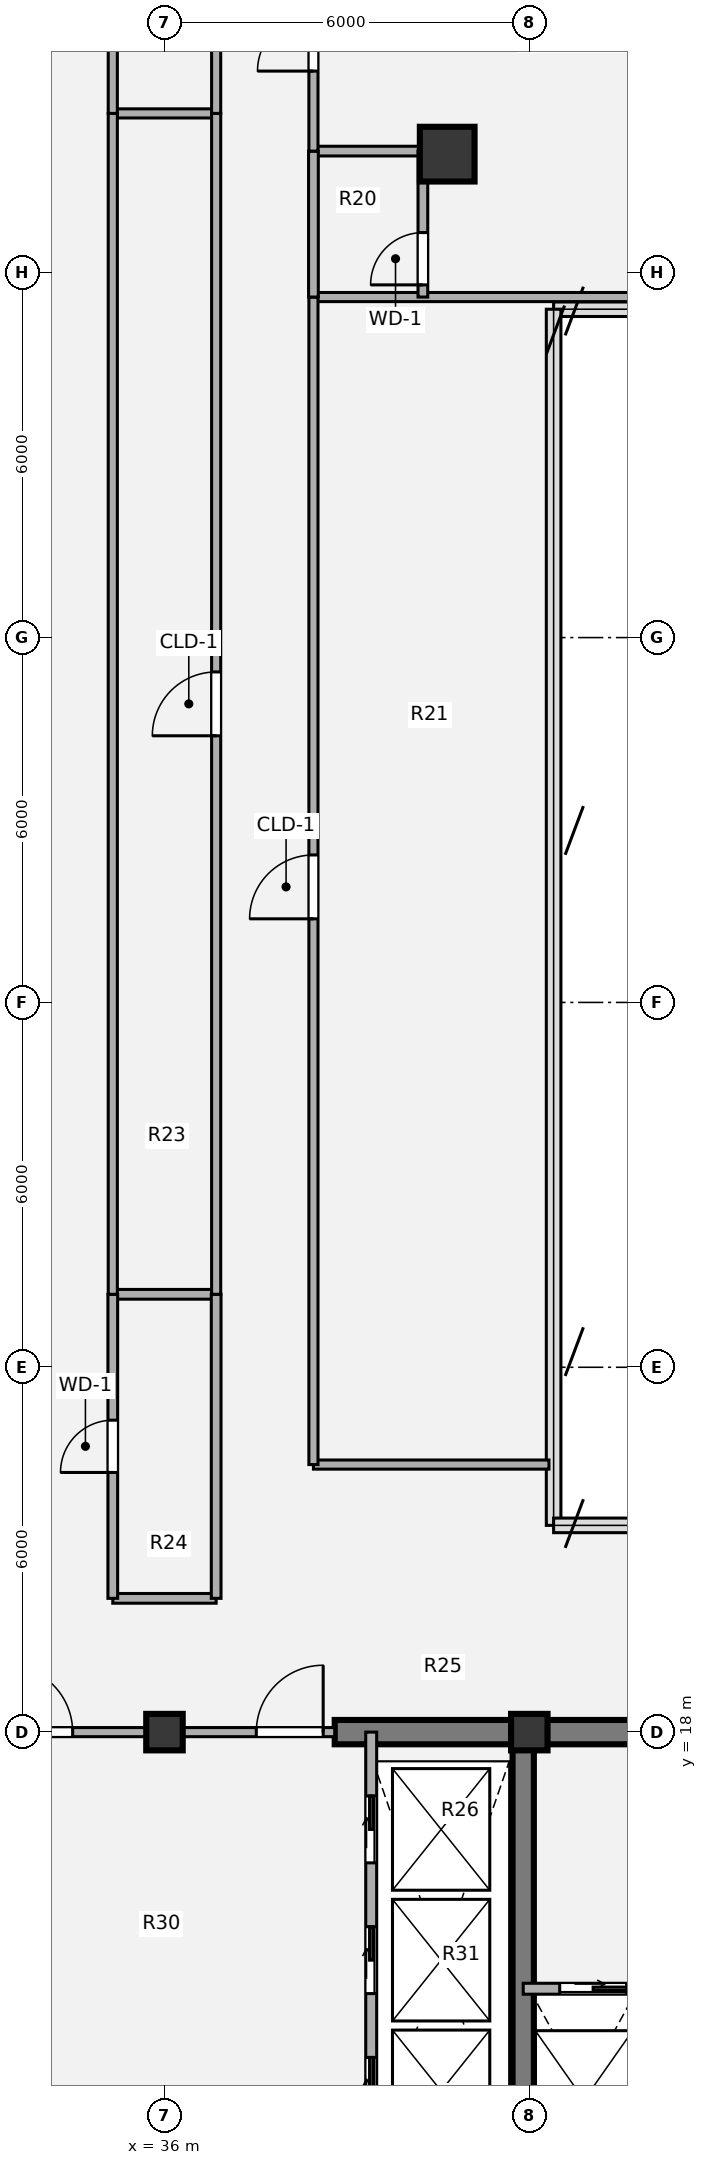
"""IFC4 building model, lengths in metres.
Left out: names, types, materials, properties, quantities, classifications, styles, units other than length and angle.
Written with IfcOpenShell. Run it as: python <this file> out.ifc"""

import sys

from ifc_helpers import new_model, si_unit, direction, frame, frame_2d, origin, origin_2d, place, context, subcontext, project, spatial, rectangle, hollow_circle, extrude, source, transform, mapped, element, fill, save


model = new_model("IFC4")
c1 = context("Model", 3, precision=1e-05, world=origin(), true_north=direction((0.0, 1.0)))
c2 = subcontext(c1, "Body", "Model", "MODEL_VIEW")
j1 = project(units=[si_unit("LENGTHUNIT", "METRE"), si_unit("PLANEANGLEUNIT", "RADIAN")], contexts=[c1])
p1 = place(None, origin())
s1 = spatial("IfcSite", under=j1, at=p1, CompositionType="ELEMENT")
p2 = place(p1, origin())
s2 = spatial("IfcBuilding", under=s1, at=p2, CompositionType="ELEMENT")
p3 = place(p2, frame((0.0, 0.0, 230.58)))
s3 = spatial("IfcBuildingStorey", under=s2, at=p3, CompositionType="ELEMENT", Elevation=230.58)
m1 = source(origin(), c2, "Body", "SweptSolid", [
    extrude(rectangle(XDim=0.6, YDim=0.6, at=origin_2d()), origin(), (0.0, 0.0, 1.0), 3.78),
])
for number, where, z_axis, x_axis in (
    (1, (36.0, 18.0, 0.0), (0.0, 0.0, 1.0), (1.0, 0.0, 0.0)),
    (2, (42.0, 18.0, 0.0), (0.0, 0.0, 1.0), (1.0, 0.0, 0.0)),
):
    element("IfcColumn", number, at=place(p3, frame(where, z_axis=z_axis, x_axis=x_axis)), inside=s3, PredefinedType="COLUMN", context=c2, shape_type="MappedRepresentation", body=[
        mapped(m1, transform((0.0, 0.0, 0.0), x_axis=(1.0, 0.0, 0.0), y_axis=(0.0, 1.0, 0.0), z_axis=(0.0, 0.0, 1.0), scale=1.0)),
    ])
p4 = place(p3, frame((38.8, 18.0, 0.0), z_axis=(0.0, 0.0, 1.0), x_axis=(1.0, 0.0, 0.0)))
e3 = element("IfcWall", 3, at=p4, inside=s3, PredefinedType="SHEAR", context=c2, shape_type="SweptSolid", body=[
    extrude(rectangle(XDim=9.4, YDim=0.4, at=frame_2d((4.7, 0.0))), origin(), (0.0, 0.0, 1.0), 3.78),
])
p5 = place(p4, frame((5.45, 0.0, 0.0)))
e4 = element("IfcOpeningElement", 4, at=p5, cuts=e3, PredefinedType="OPENING", context=c2, shape_type="SweptSolid", body=[
    extrude(rectangle(XDim=1.1, YDim=2.1, at=origin_2d()), frame((0.55, 0.21, 1.05), z_axis=(0.0, -1.0, 0.0), x_axis=(1.0, 0.0, 0.0)), (0.0, 0.0, 1.0), 0.42),
])
p6 = place(p3, frame((41.9, 18.0, 0.0), z_axis=(0.0, 0.0, 1.0), x_axis=(0.0, -1.0, 0.0)))
e5 = element("IfcWall", 5, at=p6, inside=s3, PredefinedType="SHEAR", context=c2, shape_type="SweptSolid", body=[
    extrude(rectangle(XDim=12.0, YDim=0.35, at=frame_2d((6.0, 0.0))), origin(), (0.0, 0.0, 1.0), 3.78),
])
p7 = place(p6, frame((10.08, 0.0, 0.0)))
e6 = element("IfcOpeningElement", 6, at=p7, cuts=e5, PredefinedType="OPENING", context=c2, shape_type="SweptSolid", body=[
    extrude(rectangle(XDim=1.3, YDim=2.1, at=origin_2d()), frame((0.65, 0.185, 1.05), z_axis=(0.0, -1.0, 0.0), x_axis=(1.0, 0.0, 0.0)), (0.0, 0.0, 1.0), 0.37),
])
m2 = source(origin(), c2, "Body", "SweptSolid", [
    extrude(hollow_circle(Radius=0.45, WallThickness=0.032, at=origin_2d()), origin(), (0.0, 0.0, 1.0), 3.78),
])
p8 = place(p3, frame((40.65, 43.95, 0.0), z_axis=(0.0, 0.0, 1.0), x_axis=(1.0, 0.0, 0.0)))
e7 = element("IfcColumn", 7, at=p8, inside=s3, PredefinedType="COLUMN", context=c2, shape_type="MappedRepresentation", body=[
    mapped(m2, transform((0.0, 0.0, 0.0), x_axis=(1.0, 0.0, 0.0), y_axis=(0.0, 1.0, 0.0), z_axis=(0.0, 0.0, 1.0), scale=1.0)),
])
p9 = place(p3, frame((33.2, 18.0, 0.0), z_axis=(0.0, 0.0, 1.0), x_axis=(1.0, 0.0, 0.0)))
e8 = element("IfcWall", 8, at=p9, inside=s3, PredefinedType="PARTITIONING", context=c2, shape_type="SweptSolid", body=[
    extrude(rectangle(XDim=5.6, YDim=0.15, at=frame_2d((2.8, 0.0))), origin(), (0.0, 0.0, 1.0), 2.515),
])
p10 = place(p9, frame((0.19, 0.0, 0.0)))
e9 = element("IfcOpeningElement", 9, at=p10, cuts=e8, PredefinedType="OPENING", context=c2, shape_type="SweptSolid", body=[
    extrude(rectangle(XDim=1.1, YDim=2.1, at=origin_2d()), frame((0.55, 0.085, 1.05), z_axis=(0.0, -1.0, 0.0), x_axis=(1.0, 0.0, 0.0)), (0.0, 0.0, 1.0), 0.17),
])
p11 = place(p9, frame((4.31, 0.0, 0.0)))
e10 = element("IfcOpeningElement", 10, at=p11, cuts=e8, PredefinedType="OPENING", context=c2, shape_type="SweptSolid", body=[
    extrude(rectangle(XDim=1.1, YDim=2.1, at=origin_2d()), frame((0.55, 0.085, 1.05), z_axis=(0.0, -1.0, 0.0), x_axis=(1.0, 0.0, 0.0)), (0.0, 0.0, 1.0), 0.17),
])
p12 = place(p3, frame((41.9, 13.78, 0.0), z_axis=(0.0, 0.0, 1.0), x_axis=(1.0, 0.0, 0.0)))
e11 = element("IfcWall", 11, at=p12, inside=s3, PredefinedType="PARTITIONING", context=c2, shape_type="SweptSolid", body=[
    extrude(rectangle(XDim=6.1, YDim=0.18, at=frame_2d((3.05, 0.0))), origin(), (0.0, 0.0, 1.0), 3.5),
])
p13 = place(p12, frame((0.6, 0.0, 0.0)))
e12 = element("IfcOpeningElement", 12, at=p13, cuts=e11, PredefinedType="OPENING", context=c2, shape_type="SweptSolid", body=[
    extrude(rectangle(XDim=1.1, YDim=2.1, at=origin_2d()), frame((0.55, 0.1, 1.05), z_axis=(0.0, -1.0, 0.0), x_axis=(1.0, 0.0, 0.0)), (0.0, 0.0, 1.0), 0.2),
])
p14 = place(p12, frame((3.8, 0.0, 0.0)))
e13 = element("IfcOpeningElement", 13, at=p14, cuts=e11, PredefinedType="OPENING", context=c2, shape_type="SweptSolid", body=[
    extrude(rectangle(XDim=1.1, YDim=2.1, at=origin_2d()), frame((0.55, 0.1, 1.05), z_axis=(0.0, -1.0, 0.0), x_axis=(1.0, 0.0, 0.0)), (0.0, 0.0, 1.0), 0.2),
])
p15 = place(p3, frame((39.4, 11.0, 0.0), z_axis=(0.0, 0.0, 1.0), x_axis=(0.0, 1.0, 0.0)))
e14 = element("IfcWall", 14, at=p15, inside=s3, PredefinedType="PARTITIONING", context=c2, shape_type="SweptSolid", body=[
    extrude(rectangle(XDim=7.0, YDim=0.18, at=frame_2d((3.5, 0.0))), origin(), (0.0, 0.0, 1.0), 3.5),
])
p16 = place(p15, frame((0.55, 0.0, 0.0)))
e15 = element("IfcOpeningElement", 15, at=p16, cuts=e14, PredefinedType="OPENING", context=c2, shape_type="SweptSolid", body=[
    extrude(rectangle(XDim=1.1, YDim=2.1, at=origin_2d()), frame((0.55, 0.1, 1.05), z_axis=(0.0, -1.0, 0.0), x_axis=(1.0, 0.0, 0.0)), (0.0, 0.0, 1.0), 0.2),
])
p17 = place(p15, frame((2.7, 0.0, 0.0)))
e16 = element("IfcOpeningElement", 16, at=p17, cuts=e14, PredefinedType="OPENING", context=c2, shape_type="SweptSolid", body=[
    extrude(rectangle(XDim=1.1, YDim=2.1, at=origin_2d()), frame((0.55, 0.1, 1.05), z_axis=(0.0, -1.0, 0.0), x_axis=(1.0, 0.0, 0.0)), (0.0, 0.0, 1.0), 0.2),
])
p18 = place(p15, frame((4.85, 0.0, 0.0)))
e17 = element("IfcOpeningElement", 17, at=p18, cuts=e14, PredefinedType="OPENING", context=c2, shape_type="SweptSolid", body=[
    extrude(rectangle(XDim=1.1, YDim=2.1, at=origin_2d()), frame((0.55, 0.1, 1.05), z_axis=(0.0, -1.0, 0.0), x_axis=(1.0, 0.0, 0.0)), (0.0, 0.0, 1.0), 0.2),
])
p19 = place(p3, frame((35.15, 20.2, 0.0), z_axis=(0.0, 0.0, 1.0), x_axis=(1.0, 0.0, 0.0)))
e18 = element("IfcWall", 18, at=p19, inside=s3, PredefinedType="PLUMBINGWALL", context=c2, shape_type="SweptSolid", body=[
    extrude(rectangle(XDim=1.7, YDim=0.16, at=frame_2d((0.85, 0.0))), origin(), (0.0, 0.0, 1.0), 3.5),
])
p20 = place(p3, frame((38.45, 22.4, 0.0), z_axis=(0.0, 0.0, 1.0), x_axis=(1.0, 0.0, 0.0)))
e19 = element("IfcWall", 19, at=p20, inside=s3, PredefinedType="PARTITIONING", context=c2, shape_type="SweptSolid", body=[
    extrude(rectangle(XDim=3.873, YDim=0.15, at=frame_2d((1.937, 0.0))), origin(), (0.0, 0.0, 1.0), 3.5),
])
p21 = place(p3, frame((35.15, 25.2, 0.0), z_axis=(0.0, 0.0, 1.0), x_axis=(1.0, 0.0, 0.0)))
e20 = element("IfcWall", 20, at=p21, inside=s3, PredefinedType="PLUMBINGWALL", context=c2, shape_type="SweptSolid", body=[
    extrude(rectangle(XDim=1.7, YDim=0.16, at=frame_2d((0.85, 0.0))), origin(), (0.0, 0.0, 1.0), 3.5),
])
p22 = place(p3, frame((38.45, 41.6, 0.0), z_axis=(0.0, 0.0, 1.0), x_axis=(1.0, 0.0, 0.0)))
e21 = element("IfcWall", 21, at=p22, inside=s3, PredefinedType="PARTITIONING", context=c2, shape_type="SweptSolid", body=[
    extrude(rectangle(XDim=5.993, YDim=0.15, at=frame_2d((2.997, 0.0))), origin(), (0.0, 0.0, 1.0), 3.5),
])
p23 = place(p3, frame((38.45, 44.0, 0.0), z_axis=(0.0, 0.0, 1.0), x_axis=(1.0, 0.0, 0.0)))
e22 = element("IfcWall", 22, at=p23, inside=s3, PredefinedType="PLUMBINGWALL", context=c2, shape_type="SweptSolid", body=[
    extrude(rectangle(XDim=1.8, YDim=0.16, at=frame_2d((0.9, 0.0))), origin(), (0.0, 0.0, 1.0), 2.903),
])
p24 = place(p3, frame((35.15, 44.62, 0.0), z_axis=(0.0, 0.0, 1.0), x_axis=(1.0, 0.0, 0.0)))
e23 = element("IfcWall", 23, at=p24, inside=s3, PredefinedType="PARTITIONING", context=c2, shape_type="SweptSolid", body=[
    extrude(rectangle(XDim=1.7, YDim=0.15, at=frame_2d((0.85, 0.0))), origin(), (0.0, 0.0, 1.0), 3.259),
])
p25 = place(p3, frame((35.15, 20.2, 0.0), z_axis=(0.0, 0.0, 1.0), x_axis=(0.0, 1.0, 0.0)))
e24 = element("IfcWall", 24, at=p25, inside=s3, PredefinedType="PLUMBINGWALL", context=c2, shape_type="SweptSolid", body=[
    extrude(rectangle(XDim=5.0, YDim=0.16, at=frame_2d((2.5, 0.0))), origin(), (0.0, 0.0, 1.0), 3.5),
])
p26 = place(p25, frame((2.07, 0.0, 0.0)))
e25 = element("IfcOpeningElement", 25, at=p26, cuts=e24, PredefinedType="OPENING", context=c2, shape_type="SweptSolid", body=[
    extrude(rectangle(XDim=0.86, YDim=2.1, at=origin_2d()), frame((0.43, 0.09, 1.05), z_axis=(0.0, -1.0, 0.0), x_axis=(1.0, 0.0, 0.0)), (0.0, 0.0, 1.0), 0.18),
])
p27 = place(p3, frame((35.15, 25.2, 0.0), z_axis=(0.0, 0.0, 1.0), x_axis=(0.0, 1.0, 0.0)))
e26 = element("IfcWall", 26, at=p27, inside=s3, PredefinedType="PARTITIONING", context=c2, shape_type="SweptSolid", body=[
    extrude(rectangle(XDim=19.42, YDim=0.15, at=frame_2d((9.71, 0.0))), origin(), (0.0, 0.0, 1.0), 3.5),
])
p28 = place(p3, frame((35.15, 44.62, 0.0), z_axis=(0.0, 0.0, 1.0), x_axis=(0.0, 1.0, 0.0)))
e27 = element("IfcWall", 27, at=p28, inside=s3, PredefinedType="PARTITIONING", context=c2, shape_type="SweptSolid", body=[
    extrude(rectangle(XDim=12.58, YDim=0.15, at=frame_2d((6.29, 0.0))), origin(), (0.0, 0.0, 1.0), 3.5),
])
p29 = place(p28, frame((5.83, 0.0, 0.0)))
e28 = element("IfcOpeningElement", 28, at=p29, cuts=e27, PredefinedType="OPENING", context=c2, shape_type="SweptSolid", body=[
    extrude(rectangle(XDim=0.86, YDim=2.1, at=origin_2d()), frame((0.43, 0.085, 1.05), z_axis=(0.0, -1.0, 0.0), x_axis=(1.0, 0.0, 0.0)), (0.0, 0.0, 1.0), 0.17),
])
p30 = place(p3, frame((36.85, 20.2, 0.0), z_axis=(0.0, 0.0, 1.0), x_axis=(0.0, 1.0, 0.0)))
e29 = element("IfcWall", 29, at=p30, inside=s3, PredefinedType="PLUMBINGWALL", context=c2, shape_type="SweptSolid", body=[
    extrude(rectangle(XDim=5.0, YDim=0.16, at=frame_2d((2.5, 0.0))), origin(), (0.0, 0.0, 1.0), 3.5),
])
p31 = place(p3, frame((36.85, 25.2, 0.0), z_axis=(0.0, 0.0, 1.0), x_axis=(0.0, 1.0, 0.0)))
e30 = element("IfcWall", 30, at=p31, inside=s3, PredefinedType="PARTITIONING", context=c2, shape_type="SweptSolid", body=[
    extrude(rectangle(XDim=19.42, YDim=0.15, at=frame_2d((9.71, 0.0))), origin(), (0.0, 0.0, 1.0), 3.5),
])
p32 = place(p31, frame((9.185, 0.0, 0.0)))
e31 = element("IfcOpeningElement", 31, at=p32, cuts=e30, PredefinedType="OPENING", context=c2, shape_type="SweptSolid", body=[
    extrude(rectangle(XDim=1.05, YDim=2.1, at=origin_2d()), frame((0.525, 0.085, 1.05), z_axis=(0.0, -1.0, 0.0), x_axis=(1.0, 0.0, 0.0)), (0.0, 0.0, 1.0), 0.17),
])
p33 = place(p3, frame((36.85, 44.62, 0.0), z_axis=(0.0, 0.0, 1.0), x_axis=(0.0, 1.0, 0.0)))
e32 = element("IfcWall", 32, at=p33, inside=s3, PredefinedType="PARTITIONING", context=c2, shape_type="SweptSolid", body=[
    extrude(rectangle(XDim=12.58, YDim=0.15, at=frame_2d((6.29, 0.0))), origin(), (0.0, 0.0, 1.0), 3.5),
])
p34 = place(p3, frame((38.45, 22.4, 0.0), z_axis=(0.0, 0.0, 1.0), x_axis=(0.0, 1.0, 0.0)))
e33 = element("IfcWall", 33, at=p34, inside=s3, PredefinedType="PARTITIONING", context=c2, shape_type="SweptSolid", body=[
    extrude(rectangle(XDim=19.2, YDim=0.15, at=frame_2d((9.6, 0.0))), origin(), (0.0, 0.0, 1.0), 3.5),
])
p35 = place(p34, frame((8.975, 0.0, 0.0)))
e34 = element("IfcOpeningElement", 34, at=p35, cuts=e33, PredefinedType="OPENING", context=c2, shape_type="SweptSolid", body=[
    extrude(rectangle(XDim=1.05, YDim=2.1, at=origin_2d()), frame((0.525, 0.085, 1.05), z_axis=(0.0, -1.0, 0.0), x_axis=(1.0, 0.0, 0.0)), (0.0, 0.0, 1.0), 0.17),
])
p36 = place(p3, frame((38.45, 41.6, 0.0), z_axis=(0.0, 0.0, 1.0), x_axis=(0.0, 1.0, 0.0)))
e35 = element("IfcWall", 35, at=p36, inside=s3, PredefinedType="PLUMBINGWALL", context=c2, shape_type="SweptSolid", body=[
    extrude(rectangle(XDim=2.4, YDim=0.16, at=frame_2d((1.2, 0.0))), origin(), (0.0, 0.0, 1.0), 3.5),
])
p37 = place(p3, frame((38.45, 44.0, 0.0), z_axis=(0.0, 0.0, 1.0), x_axis=(0.0, 1.0, 0.0)))
e36 = element("IfcWall", 36, at=p37, inside=s3, PredefinedType="PARTITIONING", context=c2, shape_type="SweptSolid", body=[
    extrude(rectangle(XDim=3.552, YDim=0.15, at=frame_2d((1.776, 0.0))), origin(), (0.0, 0.0, 1.0), 3.5),
])
p38 = place(p37, frame((1.316, 0.0, 0.0)))
e37 = element("IfcOpeningElement", 37, at=p38, cuts=e36, PredefinedType="OPENING", context=c2, shape_type="SweptSolid", body=[
    extrude(rectangle(XDim=0.92, YDim=2.1, at=origin_2d()), frame((0.46, 0.085, 1.05), z_axis=(0.0, -1.0, 0.0), x_axis=(1.0, 0.0, 0.0)), (0.0, 0.0, 1.0), 0.17),
])
p39 = place(p3, frame((40.25, 41.6, 0.0), z_axis=(0.0, 0.0, 1.0), x_axis=(0.0, 1.0, 0.0)))
e38 = element("IfcWall", 38, at=p39, inside=s3, PredefinedType="PLUMBINGWALL", context=c2, shape_type="SweptSolid", body=[
    extrude(rectangle(XDim=2.4, YDim=0.16, at=frame_2d((1.2, 0.0))), origin(), (0.0, 0.0, 1.0), 3.5),
])
p40 = place(p39, frame((0.2, 0.0, 0.0)))
e39 = element("IfcOpeningElement", 39, at=p40, cuts=e38, PredefinedType="OPENING", context=c2, shape_type="SweptSolid", body=[
    extrude(rectangle(XDim=0.86, YDim=2.1, at=origin_2d()), frame((0.43, 0.09, 1.05), z_axis=(0.0, -1.0, 0.0), x_axis=(1.0, 0.0, 0.0)), (0.0, 0.0, 1.0), 0.18),
])
m3 = source(origin(), c2, "Body", "SweptSolid", [
    extrude(rectangle(XDim=1.1, YDim=2.1, at=origin_2d()), frame((0.55, 0.025, 1.05), z_axis=(0.0, -1.0, 0.0), x_axis=(1.0, 0.0, 0.0)), (0.0, 0.0, 1.0), 0.05),
])
p41 = place(p10, origin())
e40 = element("IfcDoor", 40, at=p41, inside=s3, OperationType="SINGLE_SWING_LEFT", PredefinedType="DOOR", context=c2, shape_type="MappedRepresentation", body=[
    mapped(m3, transform((0.0, 0.0, 0.0), x_axis=(1.0, 0.0, 0.0), y_axis=(0.0, 1.0, 0.0), z_axis=(0.0, 0.0, 1.0), scale=1.0)),
])
fill(e9, e40)
p42 = place(p11, origin())
e41 = element("IfcDoor", 41, at=p42, inside=s3, OperationType="SINGLE_SWING_RIGHT", PredefinedType="DOOR", context=c2, shape_type="MappedRepresentation", body=[
    mapped(m3, transform((0.0, 0.0, 0.0), x_axis=(1.0, 0.0, 0.0), y_axis=(0.0, 1.0, 0.0), z_axis=(0.0, 0.0, 1.0), scale=1.0)),
])
fill(e10, e41)
m4 = source(origin(), c2, "Body", "SweptSolid", [
    extrude(rectangle(XDim=1.1, YDim=2.1, at=origin_2d()), frame((0.55, 0.025, 1.05), z_axis=(0.0, -1.0, 0.0), x_axis=(1.0, 0.0, 0.0)), (0.0, 0.0, 1.0), 0.05),
])
p43 = place(p13, origin())
e42 = element("IfcDoor", 42, at=p43, inside=s3, OperationType="SLIDING_TO_RIGHT", PredefinedType="DOOR", context=c2, shape_type="MappedRepresentation", body=[
    mapped(m4, transform((0.0, 0.0, 0.0), x_axis=(1.0, 0.0, 0.0), y_axis=(0.0, 1.0, 0.0), z_axis=(0.0, 0.0, 1.0), scale=1.0)),
])
fill(e12, e42)
p44 = place(p16, origin())
e43 = element("IfcDoor", 43, at=p44, inside=s3, OperationType="SLIDING_TO_RIGHT", PredefinedType="DOOR", context=c2, shape_type="MappedRepresentation", body=[
    mapped(m4, transform((0.0, 0.0, 0.0), x_axis=(1.0, 0.0, 0.0), y_axis=(0.0, 1.0, 0.0), z_axis=(0.0, 0.0, 1.0), scale=1.0)),
])
fill(e15, e43)
p45 = place(p17, origin())
e44 = element("IfcDoor", 44, at=p45, inside=s3, OperationType="SLIDING_TO_RIGHT", PredefinedType="DOOR", context=c2, shape_type="MappedRepresentation", body=[
    mapped(m4, transform((0.0, 0.0, 0.0), x_axis=(1.0, 0.0, 0.0), y_axis=(0.0, 1.0, 0.0), z_axis=(0.0, 0.0, 1.0), scale=1.0)),
])
fill(e16, e44)
p46 = place(p18, origin())
e45 = element("IfcDoor", 45, at=p46, inside=s3, OperationType="SLIDING_TO_RIGHT", PredefinedType="DOOR", context=c2, shape_type="MappedRepresentation", body=[
    mapped(m4, transform((0.0, 0.0, 0.0), x_axis=(1.0, 0.0, 0.0), y_axis=(0.0, 1.0, 0.0), z_axis=(0.0, 0.0, 1.0), scale=1.0)),
])
fill(e17, e45)
m5 = source(origin(), c2, "Body", "SweptSolid", [
    extrude(rectangle(XDim=0.86, YDim=2.1, at=origin_2d()), frame((0.43, 0.025, 1.05), z_axis=(0.0, -1.0, 0.0), x_axis=(1.0, 0.0, 0.0)), (0.0, 0.0, 1.0), 0.05),
])
p47 = place(p26, origin())
e46 = element("IfcDoor", 46, at=p47, inside=s3, OperationType="SINGLE_SWING_LEFT", PredefinedType="DOOR", context=c2, shape_type="MappedRepresentation", body=[
    mapped(m5, transform((0.0, 0.0, 0.0), x_axis=(1.0, 0.0, 0.0), y_axis=(0.0, 1.0, 0.0), z_axis=(0.0, 0.0, 1.0), scale=1.0)),
])
fill(e25, e46)
m6 = source(origin(), c2, "Body", "SweptSolid", [
    extrude(rectangle(XDim=1.05, YDim=2.1, at=origin_2d()), frame((0.525, 0.025, 1.05), z_axis=(0.0, -1.0, 0.0), x_axis=(1.0, 0.0, 0.0)), (0.0, 0.0, 1.0), 0.05),
])
p48 = place(p32, origin())
e47 = element("IfcDoor", 47, at=p48, inside=s3, OperationType="SINGLE_SWING_LEFT", PredefinedType="DOOR", context=c2, shape_type="MappedRepresentation", body=[
    mapped(m6, transform((0.0, 0.0, 0.0), x_axis=(1.0, 0.0, 0.0), y_axis=(0.0, 1.0, 0.0), z_axis=(0.0, 0.0, 1.0), scale=1.0)),
])
fill(e31, e47)
p49 = place(p35, origin())
e48 = element("IfcDoor", 48, at=p49, inside=s3, OperationType="SINGLE_SWING_LEFT", PredefinedType="DOOR", context=c2, shape_type="MappedRepresentation", body=[
    mapped(m6, transform((0.0, 0.0, 0.0), x_axis=(1.0, 0.0, 0.0), y_axis=(0.0, 1.0, 0.0), z_axis=(0.0, 0.0, 1.0), scale=1.0)),
])
fill(e34, e48)
m7 = source(origin(), c2, "Body", "SweptSolid", [
    extrude(rectangle(XDim=0.92, YDim=2.1, at=origin_2d()), frame((0.46, 0.025, 1.05), z_axis=(0.0, -1.0, 0.0), x_axis=(1.0, 0.0, 0.0)), (0.0, 0.0, 1.0), 0.05),
])
p50 = place(p38, origin())
e49 = element("IfcDoor", 49, at=p50, inside=s3, OperationType="SINGLE_SWING_LEFT", PredefinedType="DOOR", context=c2, shape_type="MappedRepresentation", body=[
    mapped(m7, transform((0.0, 0.0, 0.0), x_axis=(1.0, 0.0, 0.0), y_axis=(0.0, 1.0, 0.0), z_axis=(0.0, 0.0, 1.0), scale=1.0)),
])
fill(e37, e49)
p51 = place(p40, origin())
e50 = element("IfcDoor", 50, at=p51, inside=s3, OperationType="SINGLE_SWING_LEFT", PredefinedType="DOOR", context=c2, shape_type="MappedRepresentation", body=[
    mapped(m5, transform((0.0, 0.0, 0.0), x_axis=(1.0, 0.0, 0.0), y_axis=(0.0, 1.0, 0.0), z_axis=(0.0, 0.0, 1.0), scale=1.0)),
])
fill(e39, e50)
save(model, sys.argv[1])
